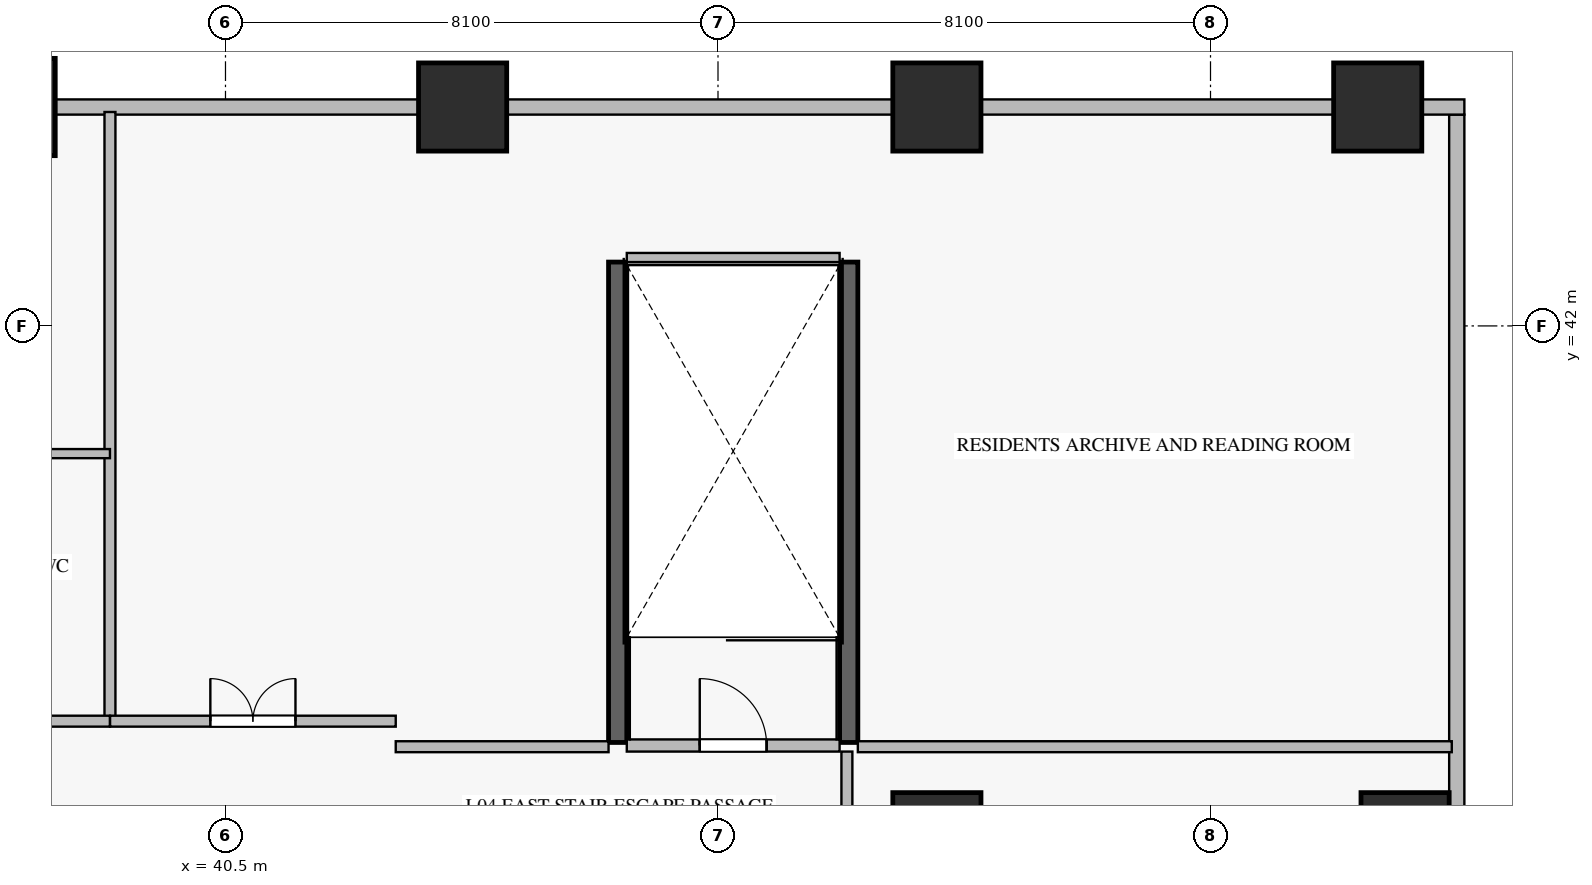
"""IFC4 building model, lengths in metres.
Left out: names, types, materials, properties, quantities, classifications, styles, units other than length and angle.
Written with IfcOpenShell. Run it as: python <this file> out.ifc"""

import sys

from ifc_helpers import new_model, si_unit, direction, frame, frame_2d, origin, origin_2d, place, context, subcontext, project, spatial, rectangle, extrude, source, transform, mapped, element, fill, save


model = new_model("IFC4")
c1 = context("Model", 3, precision=1e-05, world=origin(), true_north=direction((0.0, 1.0)))
c2 = subcontext(c1, "Body", "Model", "MODEL_VIEW")
j1 = project(units=[si_unit("LENGTHUNIT", "METRE"), si_unit("PLANEANGLEUNIT", "RADIAN")], contexts=[c1])
p1 = place(None, origin())
s1 = spatial("IfcSite", under=j1, at=p1, CompositionType="ELEMENT")
p2 = place(p1, origin())
s2 = spatial("IfcBuilding", under=s1, at=p2, CompositionType="ELEMENT")
p3 = place(p2, frame((0.0, 0.0, 21.0)))
s3 = spatial("IfcBuildingStorey", under=s2, at=p3, CompositionType="ELEMENT", Elevation=21.0)
m1 = source(origin(), c2, "Body", "SweptSolid", [
    extrude(rectangle(XDim=1.6, YDim=1.6, at=origin_2d()), origin(), (0.0, 0.0, 1.0), 6.11),
])
p4 = place(p3, frame((36.9, 45.6, -0.85), z_axis=(0.0, 0.0, 1.0), x_axis=(1.0, 0.0, 0.0)))
e1 = element("IfcColumn", 1, at=p4, inside=s3, PredefinedType="COLUMN", context=c2, shape_type="MappedRepresentation", body=[
    mapped(m1, transform((0.0, 0.0, 0.0), scale=1.0)),
])
m2 = source(origin(), c2, "Body", "SweptSolid", [
    extrude(rectangle(XDim=1.45, YDim=1.45, at=origin_2d()), origin(), (0.0, 0.0, 1.0), 6.11),
])
for number, where, z_axis, x_axis in (
    (2, (44.4, 45.6, -0.85), (0.0, 0.0, 1.0), (1.0, 0.0, 0.0)),
    (3, (52.2, 45.6, -0.85), (0.0, 0.0, 1.0), (1.0, 0.0, 0.0)),
    (4, (52.2, 33.6, -0.85), (0.0, 0.0, 1.0), (1.0, 0.0, 0.0)),
    (5, (59.9, 33.6, -0.85), (0.0, 0.0, 1.0), (1.0, 0.0, 0.0)),
    (6, (59.45, 45.6, -0.85), (0.0, 0.0, 1.0), (1.0, 0.0, 0.0)),
):
    element("IfcColumn", number, at=place(p3, frame(where, z_axis=z_axis, x_axis=x_axis)), inside=s3, PredefinedType="COLUMN", context=c2, shape_type="MappedRepresentation", body=[
        mapped(m2, transform((0.0, 0.0, 0.0), scale=1.0)),
    ])
p5 = place(p3, frame((60.75, 4.925, 0.0), z_axis=(0.0, 0.0, 1.0), x_axis=(0.0, 1.0, 0.0)))
e7 = element("IfcWall", 7, at=p5, inside=s3, PredefinedType="ELEMENTEDWALL", context=c2, shape_type="SweptSolid", body=[
    extrude(rectangle(XDim=40.55, YDim=0.25, at=frame_2d((20.275, 0.0))), origin(), (0.0, 0.0, 1.0), 5.245),
])
p6 = place(p5, frame((14.497, 0.0, 0.6)))
e8 = element("IfcOpeningElement", 8, at=p6, cuts=e7, PredefinedType="OPENING", context=c2, shape_type="SweptSolid", body=[
    extrude(rectangle(XDim=2.4, YDim=2.6, at=frame_2d((1.2, 1.3))), frame((0.0, 0.135, 0.0), z_axis=(0.0, -1.0, 0.0), x_axis=(1.0, 0.0, 0.0)), (0.0, 0.0, 1.0), 0.27),
])
p7 = place(p5, frame((23.653, 0.0, 0.6)))
e9 = element("IfcOpeningElement", 9, at=p7, cuts=e7, PredefinedType="OPENING", context=c2, shape_type="SweptSolid", body=[
    extrude(rectangle(XDim=2.4, YDim=2.6, at=frame_2d((1.2, 1.3))), frame((0.0, 0.135, 0.0), z_axis=(0.0, -1.0, 0.0), x_axis=(1.0, 0.0, 0.0)), (0.0, 0.0, 1.0), 0.27),
])
p8 = place(p3, frame((60.875, 45.6, 0.0), z_axis=(0.0, 0.0, 1.0), x_axis=(-1.0, 0.0, 0.0)))
e10 = element("IfcWall", 10, at=p8, inside=s3, PredefinedType="ELEMENTEDWALL", context=c2, shape_type="SweptSolid", body=[
    extrude(rectangle(XDim=56.95, YDim=0.25, at=frame_2d((28.475, 0.0))), origin(), (0.0, 0.0, 1.0), 2.845),
])
for number, where, z_axis, x_axis in (
    (11, (46.95, 35.15, -0.85), (0.0, 0.0, 1.0), (0.0, 1.0, 0.0)),
    (12, (50.75, 35.15, -0.85), (0.0, 0.0, 1.0), (0.0, 1.0, 0.0)),
):
    element("IfcWall", number, at=place(p3, frame(where, z_axis=z_axis, x_axis=x_axis)), inside=s3, PredefinedType="SHEAR", context=c2, shape_type="SweptSolid", body=[
        extrude(rectangle(XDim=7.9, YDim=0.3, at=frame_2d((3.95, 0.0))), origin(), (0.0, 0.0, 1.0), 6.108),
    ])
p9 = place(p3, frame((47.1, 35.1, 0.0), z_axis=(0.0, 0.0, 1.0), x_axis=(1.0, 0.0, 0.0)))
e13 = element("IfcWall", 13, at=p9, inside=s3, PredefinedType="STANDARD", context=c2, shape_type="SweptSolid", body=[
    extrude(rectangle(XDim=3.5, YDim=0.2, at=frame_2d((1.75, 0.0))), origin(), (0.0, 0.0, 1.0), 5.26),
])
p10 = place(p9, frame((1.2, 0.0, 0.0)))
e14 = element("IfcOpeningElement", 14, at=p10, cuts=e13, PredefinedType="OPENING", context=c2, shape_type="SweptSolid", body=[
    extrude(rectangle(XDim=1.1, YDim=2.15, at=frame_2d((0.55, 1.075))), frame((0.0, 0.11, 0.0), z_axis=(0.0, -1.0, 0.0), x_axis=(1.0, 0.0, 0.0)), (0.0, 0.0, 1.0), 0.22),
])
p11 = place(p3, frame((47.1, 43.1, 0.0), z_axis=(0.0, 0.0, 1.0), x_axis=(1.0, 0.0, 0.0)))
e15 = element("IfcWall", 15, at=p11, inside=s3, PredefinedType="STANDARD", context=c2, shape_type="SweptSolid", body=[
    extrude(rectangle(XDim=3.5, YDim=0.2, at=frame_2d((1.75, 0.0))), origin(), (0.0, 0.0, 1.0), 5.26),
])
p12 = place(p3, frame((43.3, 35.08, 0.0), z_axis=(0.0, 0.0, 1.0), x_axis=(1.0, 0.0, 0.0)))
e16 = element("IfcWall", 16, at=p12, inside=s3, PredefinedType="PARTITIONING", context=c2, shape_type="SweptSolid", body=[
    extrude(rectangle(XDim=3.5, YDim=0.18, at=frame_2d((1.75, 0.0))), origin(), (0.0, 0.0, 1.0), 5.26),
])
p13 = place(p3, frame((50.9, 35.08, 0.0), z_axis=(0.0, 0.0, 1.0), x_axis=(1.0, 0.0, 0.0)))
e17 = element("IfcWall", 17, at=p13, inside=s3, PredefinedType="PARTITIONING", context=c2, shape_type="SweptSolid", body=[
    extrude(rectangle(XDim=9.768, YDim=0.18, at=frame_2d((4.884, 0.0))), origin(), (0.0, 0.0, 1.0), 5.26),
])
p14 = place(p3, frame((50.72, 33.08, 0.0), z_axis=(0.0, 0.0, 1.0), x_axis=(0.0, 1.0, 0.0)))
e18 = element("IfcWall", 18, at=p14, inside=s3, PredefinedType="PARTITIONING", context=c2, shape_type="SweptSolid", body=[
    extrude(rectangle(XDim=1.92, YDim=0.18, at=frame_2d((0.96, 0.0))), origin(), (0.0, 0.0, 1.0), 5.26),
])
p15 = place(p3, frame((38.6, 35.5, 0.0), z_axis=(0.0, 0.0, 1.0), x_axis=(0.0, 1.0, 0.0)))
e19 = element("IfcWall", 19, at=p15, inside=s3, PredefinedType="PARTITIONING", context=c2, shape_type="SweptSolid", body=[
    extrude(rectangle(XDim=10.018, YDim=0.18, at=frame_2d((5.009, 0.0))), origin(), (0.0, 0.0, 1.0), 5.26),
])
p16 = place(p3, frame((33.602, 35.5, 0.0), z_axis=(0.0, 0.0, 1.0), x_axis=(1.0, 0.0, 0.0)))
e20 = element("IfcWall", 20, at=p16, inside=s3, PredefinedType="PARTITIONING", context=c2, shape_type="SweptSolid", body=[
    extrude(rectangle(XDim=4.998, YDim=0.18, at=frame_2d((2.499, 0.0))), origin(), (0.0, 0.0, 1.0), 5.26),
])
p17 = place(p16, frame((1.999, 0.0, 0.0)))
e21 = element("IfcOpeningElement", 21, at=p17, cuts=e20, PredefinedType="OPENING", context=c2, shape_type="SweptSolid", body=[
    extrude(rectangle(XDim=1.0, YDim=2.15, at=frame_2d((0.5, 1.075))), frame((0.0, 0.1, 0.0), z_axis=(0.0, -1.0, 0.0), x_axis=(1.0, 0.0, 0.0)), (0.0, 0.0, 1.0), 0.2),
])
p18 = place(p3, frame((38.602, 35.5, 0.0), z_axis=(0.0, 0.0, 1.0), x_axis=(1.0, 0.0, 0.0)))
e22 = element("IfcWall", 22, at=p18, inside=s3, PredefinedType="PARTITIONING", context=c2, shape_type="SweptSolid", body=[
    extrude(rectangle(XDim=4.698, YDim=0.18, at=frame_2d((2.349, 0.0))), origin(), (0.0, 0.0, 1.0), 5.26),
])
p19 = place(p18, frame((1.649, 0.0, 0.0)))
e23 = element("IfcOpeningElement", 23, at=p19, cuts=e22, PredefinedType="OPENING", context=c2, shape_type="SweptSolid", body=[
    extrude(rectangle(XDim=1.4, YDim=2.25, at=frame_2d((0.7, 1.125))), frame((0.0, 0.1, 0.0), z_axis=(0.0, -1.0, 0.0), x_axis=(1.0, 0.0, 0.0)), (0.0, 0.0, 1.0), 0.2),
])
p20 = place(p3, frame((26.2, 39.9, 0.0), z_axis=(0.0, 0.0, 1.0), x_axis=(1.0, 0.0, 0.0)))
e24 = element("IfcWall", 24, at=p20, inside=s3, PredefinedType="PARTITIONING", context=c2, shape_type="SweptSolid", body=[
    extrude(rectangle(XDim=12.4, YDim=0.15, at=frame_2d((6.2, 0.0))), origin(), (0.0, 0.0, 1.0), 5.26),
])
p21 = place(p20, frame((2.07, 0.0, 0.0)))
e25 = element("IfcOpeningElement", 25, at=p21, cuts=e24, PredefinedType="OPENING", context=c2, shape_type="SweptSolid", body=[
    extrude(rectangle(XDim=0.9, YDim=2.1, at=frame_2d((0.45, 1.05))), frame((0.0, 0.085, 0.0), z_axis=(0.0, -1.0, 0.0), x_axis=(1.0, 0.0, 0.0)), (0.0, 0.0, 1.0), 0.17),
])
m3 = source(origin(), c2, "Body", "SweptSolid", [
    extrude(rectangle(XDim=1.1, YDim=2.15, at=frame_2d((0.55, 1.075))), frame((0.0, 0.025, 0.0), z_axis=(0.0, -1.0, 0.0), x_axis=(1.0, 0.0, 0.0)), (0.0, 0.0, 1.0), 0.05),
])
p22 = place(p10, origin())
e26 = element("IfcDoor", 26, at=p22, inside=s3, OperationType="SINGLE_SWING_LEFT", PredefinedType="DOOR", context=c2, shape_type="MappedRepresentation", body=[
    mapped(m3, transform((0.0, 0.0, 0.0), scale=1.0)),
])
fill(e14, e26)
m4 = source(origin(), c2, "Body", "SweptSolid", [
    extrude(rectangle(XDim=1.4, YDim=2.25, at=frame_2d((0.7, 1.125))), frame((0.0, 0.025, 0.0), z_axis=(0.0, -1.0, 0.0), x_axis=(1.0, 0.0, 0.0)), (0.0, 0.0, 1.0), 0.05),
])
p23 = place(p19, origin())
e27 = element("IfcDoor", 27, at=p23, inside=s3, OperationType="DOUBLE_DOOR_SINGLE_SWING", PredefinedType="DOOR", context=c2, shape_type="MappedRepresentation", body=[
    mapped(m4, transform((0.0, 0.0, 0.0), scale=1.0)),
])
fill(e23, e27)
save(model, sys.argv[1])
